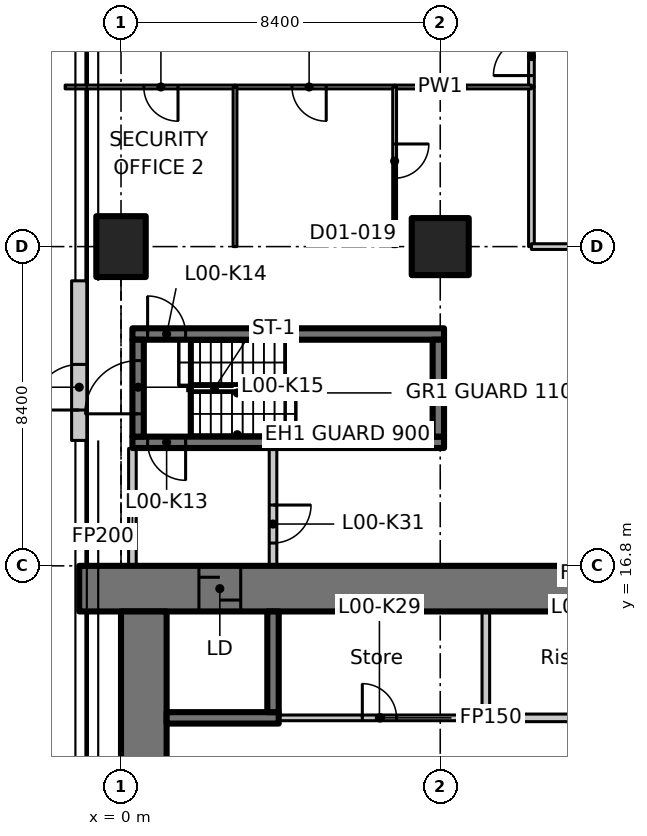
"""IFC4 building model, lengths in metres.
Left out: names, types, materials, properties, quantities, classifications, styles, units other than length and angle.
Written with IfcOpenShell. Run it as: python <this file> out.ifc"""

import sys

from ifc_helpers import new_model, si_unit, direction, frame, frame_2d, origin, origin_2d, place, context, subcontext, project, spatial, polyline, rectangle, outline, extrude, element, fill, save


model = new_model("IFC4")
c1 = context("Model", 3, precision=1e-05, world=origin(), true_north=direction((0.0, 1.0)))
c2 = subcontext(c1, "Body", "Model", "MODEL_VIEW")
j1 = project(units=[si_unit("LENGTHUNIT", "METRE"), si_unit("PLANEANGLEUNIT", "RADIAN")], contexts=[c1])
p1 = place(None, origin())
s1 = spatial("IfcSite", under=j1, at=p1, CompositionType="ELEMENT")
p2 = place(p1, origin())
s2 = spatial("IfcBuilding", under=s1, at=p2, CompositionType="ELEMENT")
p3 = place(p2, origin())
s3 = spatial("IfcBuildingStorey", under=s2, at=p3, CompositionType="ELEMENT", Elevation=0.0)
p4 = place(p3, frame((0.0, 25.2, 0.0), z_axis=(0.0, 0.0, 1.0), x_axis=(1.0, 0.0, 0.0)))
e1 = element("IfcColumn", 1, at=p4, inside=s3, PredefinedType="COLUMN", context=c2, shape_type="SweptSolid", body=[
    extrude(rectangle(XDim=1.3, YDim=1.6, at=origin_2d()), origin(), (0.0, 0.0, 1.0), 6.75),
])
p5 = place(p3, frame((8.4, 25.2, 0.0), z_axis=(0.0, 0.0, 1.0), x_axis=(1.0, 0.0, 0.0)))
e2 = element("IfcColumn", 2, at=p5, inside=s3, PredefinedType="COLUMN", context=c2, shape_type="SweptSolid", body=[
    extrude(rectangle(XDim=1.5, YDim=1.5, at=origin_2d()), origin(), (0.0, 0.0, 1.0), 6.75),
])
p6 = place(p3, frame((-4.1, 42.0, 0.0), z_axis=(1.0, 0.0, 0.0), x_axis=(0.0, 1.0, 0.0)))
e3 = element("IfcWall", 3, at=p6, inside=s3, PredefinedType="SOLIDWALL", context=c2, shape_type="SweptSolid", body=[
    extrude(outline(polyline([(13.304, 32.111), (13.636, 31.229), (13.909, 30.327), (14.123, 29.409), (14.277, 28.479), (14.369, 27.542), (14.4, 26.6), (14.4, 0.0), (8.4, 0.0), (8.4, 26.6), (8.382, 27.149), (8.328, 27.696), (8.239, 28.239), (8.114, 28.774), (7.954, 29.3), (7.76, 29.814), (7.534, 30.315), (7.275, 30.8), (6.984, 31.267), (6.664, 31.714), (6.315, 32.138), (5.94, 32.54), (5.539, 32.915), (5.114, 33.264), (4.667, 33.584), (4.2, 33.875), (3.715, 34.134), (3.215, 34.361), (2.7, 34.554), (2.174, 34.714), (1.639, 34.839), (1.096, 34.928), (0.549, 34.982), (0.0, 35.0), (-0.549, 34.982), (-1.096, 34.928), (-1.639, 34.839), (-2.174, 34.714), (-2.7, 34.554), (-3.215, 34.361), (-3.715, 34.134), (-4.2, 33.875), (-4.667, 33.584), (-5.114, 33.264), (-5.539, 32.915), (-5.94, 32.54), (-6.315, 32.138), (-6.664, 31.714), (-6.984, 31.267), (-7.275, 30.8), (-7.534, 30.315), (-7.76, 29.814), (-7.954, 29.3), (-8.114, 28.774), (-8.239, 28.239), (-8.328, 27.696), (-8.382, 27.149), (-8.4, 26.6), (-8.4, 0.0), (-14.4, 0.0), (-14.4, 26.6), (-14.369, 27.542), (-14.277, 28.479), (-14.123, 29.409), (-13.909, 30.327), (-13.636, 31.229), (-13.304, 32.111), (-13.241, 32.25), (-10.8, 32.25), (-10.8, 36.123), (-10.182, 36.782), (-9.495, 37.427), (-8.766, 38.024), (-8.0, 38.573), (-7.2, 39.071), (-6.369, 39.515), (-5.51, 39.904), (-4.629, 40.236), (-3.727, 40.509), (-2.809, 40.723), (-1.88, 40.877), (-0.942, 40.969), (0.0, 41.0), (0.942, 40.969), (1.88, 40.877), (2.809, 40.723), (3.727, 40.509), (4.629, 40.236), (5.51, 39.904), (6.369, 39.515), (7.2, 39.071), (8.0, 38.573), (8.766, 38.024), (9.495, 37.427), (10.182, 36.782), (10.8, 36.123), (10.8, 32.25), (13.241, 32.25), (13.304, 32.111)])), origin(), (0.0, 0.0, 1.0), 2.6),
])
p7 = place(p3, frame((-1.1, 20.1, 0.0), z_axis=(0.0, 0.0, 1.0), x_axis=(0.0, 1.0, 0.0)))
e4 = element("IfcWall", 4, at=p7, inside=s3, PredefinedType="SOLIDWALL", context=c2, shape_type="SweptSolid", body=[
    extrude(rectangle(XDim=4.2, YDim=0.4, at=frame_2d((2.1, 0.0))), origin(), (0.0, 0.0, 1.0), 6.75),
])
p8 = place(p7, frame((0.8, 0.0, 0.0)))
e5 = element("IfcOpeningElement", 5, at=p8, cuts=e4, PredefinedType="OPENING", context=c2, shape_type="SweptSolid", body=[
    extrude(rectangle(XDim=1.2, YDim=2.4, at=frame_2d((0.6, 1.2))), frame((0.0, 0.21, 0.0), z_axis=(0.0, -1.0, 0.0), x_axis=(1.0, 0.0, 0.0)), (0.0, 0.0, 1.0), 0.42),
])
p9 = place(p3, frame((-1.1, 16.2, 0.0), z_axis=(0.0, 0.0, 1.0), x_axis=(1.0, 0.0, 0.0)))
e6 = element("IfcWall", 6, at=p9, inside=s3, PredefinedType="SHEAR", context=c2, shape_type="SweptSolid", body=[
    extrude(rectangle(XDim=22.1, YDim=1.2, at=frame_2d((11.05, 0.0))), origin(), (0.0, 0.0, 1.0), 6.75),
])
p10 = place(p9, frame((3.15, 0.0, 0.0)))
e7 = element("IfcOpeningElement", 7, at=p10, cuts=e6, PredefinedType="OPENING", context=c2, shape_type="SweptSolid", body=[
    extrude(rectangle(XDim=1.1, YDim=2.3, at=frame_2d((0.55, 1.15))), frame((0.0, 0.61, 0.0), z_axis=(0.0, -1.0, 0.0), x_axis=(1.0, 0.0, 0.0)), (0.0, 0.0, 1.0), 1.22),
])
p11 = place(p3, frame((0.6, 6.736, 0.0), z_axis=(0.0, 0.0, 1.0), x_axis=(0.0, 1.0, 0.0)))
e8 = element("IfcWall", 8, at=p11, inside=s3, PredefinedType="SHEAR", context=c2, shape_type="SweptSolid", body=[
    extrude(rectangle(XDim=8.864, YDim=1.2, at=frame_2d((4.432, 0.0))), origin(), (0.0, 0.0, 1.0), 6.75),
])
p12 = place(p3, frame((1.2, 12.8, 0.0), z_axis=(0.0, 0.0, 1.0), x_axis=(1.0, 0.0, 0.0)))
e9 = element("IfcWall", 9, at=p12, inside=s3, PredefinedType="SHEAR", context=c2, shape_type="SweptSolid", body=[
    extrude(rectangle(XDim=2.95, YDim=0.3, at=frame_2d((1.475, 0.0))), origin(), (0.0, 0.0, 1.0), 6.75),
])
p13 = place(p3, frame((4.0, 12.95, 0.0), z_axis=(0.0, 0.0, 1.0), x_axis=(0.0, 1.0, 0.0)))
e10 = element("IfcWall", 10, at=p13, inside=s3, PredefinedType="SHEAR", context=c2, shape_type="SweptSolid", body=[
    extrude(rectangle(XDim=2.65, YDim=0.3, at=frame_2d((1.325, 0.0))), origin(), (0.0, 0.0, 1.0), 6.75),
])
p14 = place(p3, frame((8.5, 20.05, 0.0), z_axis=(0.0, 0.0, 1.0), x_axis=(-1.0, 0.0, 0.0)))
e11 = element("IfcWall", 11, at=p14, inside=s3, PredefinedType="SHEAR", context=c2, shape_type="SweptSolid", body=[
    extrude(rectangle(XDim=8.2, YDim=0.3, at=frame_2d((4.1, 0.0))), origin(), (0.0, 0.0, 1.0), 6.75),
])
p15 = place(p14, frame((6.8, 0.0, 0.0)))
e12 = element("IfcOpeningElement", 12, at=p15, cuts=e11, PredefinedType="OPENING", context=c2, shape_type="SweptSolid", body=[
    extrude(rectangle(XDim=1.0, YDim=2.1, at=frame_2d((0.5, 1.05))), frame((0.0, 0.16, 0.0), z_axis=(0.0, -1.0, 0.0), x_axis=(1.0, 0.0, 0.0)), (0.0, 0.0, 1.0), 0.32),
])
p16 = place(p3, frame((0.3, 22.9, 0.0), z_axis=(0.0, 0.0, 1.0), x_axis=(1.0, 0.0, 0.0)))
e13 = element("IfcWall", 13, at=p16, inside=s3, PredefinedType="SHEAR", context=c2, shape_type="SweptSolid", body=[
    extrude(rectangle(XDim=8.2, YDim=0.3, at=frame_2d((4.1, 0.0))), origin(), (0.0, 0.0, 1.0), 6.75),
])
p17 = place(p16, frame((0.4, 0.0, 0.0)))
e14 = element("IfcOpeningElement", 14, at=p17, cuts=e13, PredefinedType="OPENING", context=c2, shape_type="SweptSolid", body=[
    extrude(rectangle(XDim=1.0, YDim=2.1, at=frame_2d((0.5, 1.05))), frame((0.0, 0.16, 0.0), z_axis=(0.0, -1.0, 0.0), x_axis=(1.0, 0.0, 0.0)), (0.0, 0.0, 1.0), 0.32),
])
p18 = place(p3, frame((0.45, 20.2, 0.0), z_axis=(0.0, 0.0, 1.0), x_axis=(0.0, 1.0, 0.0)))
e15 = element("IfcWall", 15, at=p18, inside=s3, PredefinedType="SHEAR", context=c2, shape_type="SweptSolid", body=[
    extrude(rectangle(XDim=2.55, YDim=0.3, at=frame_2d((1.275, 0.0))), origin(), (0.0, 0.0, 1.0), 6.75),
])
p19 = place(p18, frame((0.6, 0.0, 0.0)))
e16 = element("IfcOpeningElement", 16, at=p19, cuts=e15, PredefinedType="OPENING", context=c2, shape_type="SweptSolid", body=[
    extrude(rectangle(XDim=1.4, YDim=2.1, at=frame_2d((0.7, 1.05))), frame((0.0, 0.16, 0.0), z_axis=(0.0, -1.0, 0.0), x_axis=(1.0, 0.0, 0.0)), (0.0, 0.0, 1.0), 0.32),
])
p20 = place(p3, frame((8.35, 20.2, 0.0), z_axis=(0.0, 0.0, 1.0), x_axis=(0.0, 1.0, 0.0)))
e17 = element("IfcWall", 17, at=p20, inside=s3, PredefinedType="SHEAR", context=c2, shape_type="SweptSolid", body=[
    extrude(rectangle(XDim=2.55, YDim=0.3, at=frame_2d((1.275, 0.0))), origin(), (0.0, 0.0, 1.0), 6.75),
])
p21 = place(p3, frame((0.3, 16.812, 0.0), z_axis=(0.0, 0.0, 1.0), x_axis=(0.0, 1.0, 0.0)))
e18 = element("IfcWall", 18, at=p21, inside=s3, PredefinedType="PARTITIONING", context=c2, shape_type="SweptSolid", body=[
    extrude(rectangle(XDim=3.076, YDim=0.2, at=frame_2d((1.538, 0.0))), origin(), (0.0, 0.0, 1.0), 6.38),
])
p22 = place(p3, frame((4.0, 19.888, 0.0), z_axis=(0.0, 0.0, 1.0), x_axis=(0.0, -1.0, 0.0)))
e19 = element("IfcWall", 19, at=p22, inside=s3, PredefinedType="PARTITIONING", context=c2, shape_type="SweptSolid", body=[
    extrude(rectangle(XDim=3.076, YDim=0.2, at=frame_2d((1.538, 0.0))), origin(), (0.0, 0.0, 1.0), 6.75),
])
p23 = place(p22, frame((1.488, 0.0, 0.0)))
e20 = element("IfcOpeningElement", 20, at=p23, cuts=e19, PredefinedType="OPENING", context=c2, shape_type="SweptSolid", body=[
    extrude(rectangle(XDim=1.0, YDim=2.1, at=frame_2d((0.5, 1.05))), frame((0.0, 0.11, 0.0), z_axis=(0.0, -1.0, 0.0), x_axis=(1.0, 0.0, 0.0)), (0.0, 0.0, 1.0), 0.22),
])
p24 = place(p3, frame((9.6, 15.588, 0.0), z_axis=(0.0, 0.0, 1.0), x_axis=(0.0, -1.0, 0.0)))
e21 = element("IfcWall", 21, at=p24, inside=s3, PredefinedType="PARTITIONING", context=c2, shape_type="SweptSolid", body=[
    extrude(rectangle(XDim=2.788, YDim=0.2, at=frame_2d((1.394, 0.0))), origin(), (0.0, 0.0, 1.0), 6.75),
])
p25 = place(p3, frame((9.7, 12.8, 0.0), z_axis=(0.0, 0.0, 1.0), x_axis=(1.0, 0.0, 0.0)))
e22 = element("IfcWall", 22, at=p25, inside=s3, PredefinedType="PARTITIONING", context=c2, shape_type="SweptSolid", body=[
    extrude(rectangle(XDim=5.338, YDim=0.2, at=frame_2d((2.669, 0.0))), origin(), (0.0, 0.0, 1.0), 6.75),
])
p26 = place(p25, frame((2.25, 0.0, 0.0)))
e23 = element("IfcOpeningElement", 23, at=p26, cuts=e22, PredefinedType="OPENING", context=c2, shape_type="SweptSolid", body=[
    extrude(rectangle(XDim=0.9, YDim=2.1, at=frame_2d((0.45, 1.05))), frame((0.0, 0.11, 0.0), z_axis=(0.0, -1.0, 0.0), x_axis=(1.0, 0.0, 0.0)), (0.0, 0.0, 1.0), 0.22),
])
p27 = place(p3, frame((4.162, 12.8, 0.0), z_axis=(0.0, 0.0, 1.0), x_axis=(1.0, 0.0, 0.0)))
e24 = element("IfcWall", 24, at=p27, inside=s3, PredefinedType="PARTITIONING", context=c2, shape_type="SweptSolid", body=[
    extrude(rectangle(XDim=5.338, YDim=0.15, at=frame_2d((2.669, 0.0))), origin(), (0.0, 0.0, 1.0), 6.75),
])
p28 = place(p27, frame((2.188, 0.0, 0.0)))
e25 = element("IfcOpeningElement", 25, at=p28, cuts=e24, PredefinedType="OPENING", context=c2, shape_type="SweptSolid", body=[
    extrude(rectangle(XDim=0.9, YDim=2.1, at=frame_2d((0.45, 1.05))), frame((0.0, 0.085, 0.0), z_axis=(0.0, -1.0, 0.0), x_axis=(1.0, 0.0, 0.0)), (0.0, 0.0, 1.0), 0.17),
])
p29 = place(p3, frame((10.8, 29.4, 0.0), z_axis=(0.0, 0.0, 1.0), x_axis=(0.0, 1.0, 0.0)))
e26 = element("IfcWall", 26, at=p29, inside=s3, PredefinedType="PARTITIONING", context=c2, shape_type="SweptSolid", body=[
    extrude(rectangle(XDim=1.8, YDim=0.15, at=frame_2d((0.9, 0.0))), origin(), (0.0, 0.0, 1.0), 6.73),
])
p30 = place(p29, frame((0.3, 0.0, 0.0)))
e27 = element("IfcOpeningElement", 27, at=p30, cuts=e26, PredefinedType="OPENING", context=c2, shape_type="SweptSolid", body=[
    extrude(rectangle(XDim=1.0, YDim=2.1, at=frame_2d((0.5, 1.05))), frame((0.0, 0.085, 0.0), z_axis=(0.0, -1.0, 0.0), x_axis=(1.0, 0.0, 0.0)), (0.0, 0.0, 1.0), 0.17),
])
p31 = place(p3, frame((10.8, 25.2, 0.0), z_axis=(0.0, 0.0, 1.0), x_axis=(0.0, 1.0, 0.0)))
e28 = element("IfcWall", 28, at=p31, inside=s3, PredefinedType="PARTITIONING", context=c2, shape_type="SweptSolid", body=[
    extrude(rectangle(XDim=4.2, YDim=0.15, at=frame_2d((2.1, 0.0))), origin(), (0.0, 0.0, 1.0), 6.73),
])
p32 = place(p3, frame((3.0, 29.4, 0.0), z_axis=(0.0, 0.0, 1.0), x_axis=(-1.0, 0.0, 0.0)))
e29 = element("IfcWall", 29, at=p32, inside=s3, PredefinedType="PARTITIONING", context=c2, shape_type="SweptSolid", body=[
    extrude(rectangle(XDim=4.47, YDim=0.1, at=frame_2d((2.235, 0.0))), origin(), (0.0, 0.0, 1.0), 6.73),
])
p33 = place(p32, frame((1.5, 0.0, 0.0)))
e30 = element("IfcOpeningElement", 30, at=p33, cuts=e29, PredefinedType="OPENING", context=c2, shape_type="SweptSolid", body=[
    extrude(rectangle(XDim=0.9, YDim=2.1, at=frame_2d((0.45, 1.05))), frame((0.0, 0.06, 0.0), z_axis=(0.0, -1.0, 0.0), x_axis=(1.0, 0.0, 0.0)), (0.0, 0.0, 1.0), 0.12),
])
p34 = place(p3, frame((7.2, 29.4, 0.0), z_axis=(0.0, 0.0, 1.0), x_axis=(-1.0, 0.0, 0.0)))
e31 = element("IfcWall", 31, at=p34, inside=s3, PredefinedType="PARTITIONING", context=c2, shape_type="SweptSolid", body=[
    extrude(rectangle(XDim=4.2, YDim=0.1, at=frame_2d((2.1, 0.0))), origin(), (0.0, 0.0, 1.0), 6.73),
])
p35 = place(p34, frame((1.8, 0.0, 0.0)))
e32 = element("IfcOpeningElement", 32, at=p35, cuts=e31, PredefinedType="OPENING", context=c2, shape_type="SweptSolid", body=[
    extrude(rectangle(XDim=0.9, YDim=2.1, at=frame_2d((0.45, 1.05))), frame((0.0, 0.06, 0.0), z_axis=(0.0, -1.0, 0.0), x_axis=(1.0, 0.0, 0.0)), (0.0, 0.0, 1.0), 0.12),
])
p36 = place(p3, frame((10.8, 29.4, 0.0), z_axis=(0.0, 0.0, 1.0), x_axis=(-1.0, 0.0, 0.0)))
e33 = element("IfcWall", 33, at=p36, inside=s3, PredefinedType="PARTITIONING", context=c2, shape_type="SweptSolid", body=[
    extrude(rectangle(XDim=3.6, YDim=0.1, at=frame_2d((1.8, 0.0))), origin(), (0.0, 0.0, 1.0), 6.73),
])
p37 = place(p3, frame((3.0, 29.4, 0.0), z_axis=(0.0, 0.0, 1.0), x_axis=(0.0, -1.0, 0.0)))
e34 = element("IfcWall", 34, at=p37, inside=s3, PredefinedType="PARTITIONING", context=c2, shape_type="SweptSolid", body=[
    extrude(rectangle(XDim=4.2, YDim=0.1, at=frame_2d((2.1, 0.0))), origin(), (0.0, 0.0, 1.0), 6.73),
])
p38 = place(p3, frame((7.2, 29.4, 0.0), z_axis=(0.0, 0.0, 1.0), x_axis=(0.0, -1.0, 0.0)))
e35 = element("IfcWall", 35, at=p38, inside=s3, PredefinedType="PARTITIONING", context=c2, shape_type="SweptSolid", body=[
    extrude(rectangle(XDim=4.2, YDim=0.1, at=frame_2d((2.1, 0.0))), origin(), (0.0, 0.0, 1.0), 6.73),
])
p39 = place(p38, frame((1.5, 0.0, 0.0)))
e36 = element("IfcOpeningElement", 36, at=p39, cuts=e35, PredefinedType="OPENING", context=c2, shape_type="SweptSolid", body=[
    extrude(rectangle(XDim=0.9, YDim=2.1, at=frame_2d((0.45, 1.05))), frame((0.0, 0.06, 0.0), z_axis=(0.0, -1.0, 0.0), x_axis=(1.0, 0.0, 0.0)), (0.0, 0.0, 1.0), 0.12),
])
p40 = place(p3, frame((15.8, 25.2, 0.0), z_axis=(0.0, 0.0, 1.0), x_axis=(-1.0, 0.0, 0.0)))
e37 = element("IfcWall", 37, at=p40, inside=s3, PredefinedType="PARTITIONING", context=c2, shape_type="SweptSolid", body=[
    extrude(rectangle(XDim=5.0, YDim=0.15, at=frame_2d((2.5, 0.0))), origin(), (0.0, 0.0, 1.0), 6.73),
])
p41 = place(p40, frame((1.65, 0.0, 0.0)))
e38 = element("IfcOpeningElement", 38, at=p41, cuts=e37, PredefinedType="OPENING", context=c2, shape_type="SweptSolid", body=[
    extrude(rectangle(XDim=1.8, YDim=2.1, at=frame_2d((0.9, 1.05))), frame((0.0, 0.085, 0.0), z_axis=(0.0, -1.0, 0.0), x_axis=(1.0, 0.0, 0.0)), (0.0, 0.0, 1.0), 0.17),
])
p42 = place(p8, origin())
e39 = element("IfcDoor", 39, at=p42, inside=s3, OperationType="SINGLE_SWING_LEFT", PredefinedType="DOOR", context=c2, shape_type="SweptSolid", body=[
    extrude(rectangle(XDim=1.2, YDim=2.4, at=frame_2d((0.6, 1.2))), frame((0.0, 0.025, 0.0), z_axis=(0.0, -1.0, 0.0), x_axis=(1.0, 0.0, 0.0)), (0.0, 0.0, 1.0), 0.05),
])
fill(e5, e39)
p43 = place(p10, origin())
e40 = element("IfcDoor", 40, at=p43, inside=s3, OperationType="SLIDING_TO_LEFT", PredefinedType="DOOR", context=c2, shape_type="SweptSolid", body=[
    extrude(rectangle(XDim=1.1, YDim=2.3, at=frame_2d((0.55, 1.15))), frame((0.0, 0.025, 0.0), z_axis=(0.0, -1.0, 0.0), x_axis=(1.0, 0.0, 0.0)), (0.0, 0.0, 1.0), 0.05),
])
fill(e7, e40)
p44 = place(p15, origin())
e41 = element("IfcDoor", 41, at=p44, inside=s3, OperationType="SINGLE_SWING_RIGHT", PredefinedType="DOOR", context=c2, shape_type="SweptSolid", body=[
    extrude(rectangle(XDim=1.0, YDim=2.1, at=frame_2d((0.5, 1.05))), frame((0.0, 0.025, 0.0), z_axis=(0.0, -1.0, 0.0), x_axis=(1.0, 0.0, 0.0)), (0.0, 0.0, 1.0), 0.05),
])
fill(e12, e41)
p45 = place(p17, origin())
e42 = element("IfcDoor", 42, at=p45, inside=s3, OperationType="SINGLE_SWING_LEFT", PredefinedType="DOOR", context=c2, shape_type="SweptSolid", body=[
    extrude(rectangle(XDim=1.0, YDim=2.1, at=frame_2d((0.5, 1.05))), frame((0.0, 0.025, 0.0), z_axis=(0.0, -1.0, 0.0), x_axis=(1.0, 0.0, 0.0)), (0.0, 0.0, 1.0), 0.05),
])
fill(e14, e42)
p46 = place(p19, origin())
e43 = element("IfcDoor", 43, at=p46, inside=s3, OperationType="SINGLE_SWING_RIGHT", PredefinedType="DOOR", context=c2, shape_type="SweptSolid", body=[
    extrude(rectangle(XDim=1.4, YDim=2.1, at=frame_2d((0.7, 1.05))), frame((0.0, 0.025, 0.0), z_axis=(0.0, -1.0, 0.0), x_axis=(1.0, 0.0, 0.0)), (0.0, 0.0, 1.0), 0.05),
])
fill(e16, e43)
p47 = place(p28, origin())
e44 = element("IfcDoor", 44, at=p47, inside=s3, OperationType="SINGLE_SWING_RIGHT", PredefinedType="DOOR", context=c2, shape_type="SweptSolid", body=[
    extrude(rectangle(XDim=0.9, YDim=2.1, at=frame_2d((0.45, 1.05))), frame((0.0, 0.025, 0.0), z_axis=(0.0, -1.0, 0.0), x_axis=(1.0, 0.0, 0.0)), (0.0, 0.0, 1.0), 0.05),
])
fill(e25, e44)
p48 = place(p23, origin())
e45 = element("IfcDoor", 45, at=p48, inside=s3, OperationType="SINGLE_SWING_RIGHT", PredefinedType="DOOR", context=c2, shape_type="SweptSolid", body=[
    extrude(rectangle(XDim=1.0, YDim=2.1, at=frame_2d((0.5, 1.05))), frame((0.0, 0.025, 0.0), z_axis=(0.0, -1.0, 0.0), x_axis=(1.0, 0.0, 0.0)), (0.0, 0.0, 1.0), 0.05),
])
fill(e20, e45)
p49 = place(p30, origin())
e46 = element("IfcDoor", 46, at=p49, inside=s3, OperationType="SINGLE_SWING_LEFT", PredefinedType="DOOR", context=c2, shape_type="SweptSolid", body=[
    extrude(rectangle(XDim=1.0, YDim=2.1, at=frame_2d((0.5, 1.05))), frame((0.0, 0.025, 0.0), z_axis=(0.0, -1.0, 0.0), x_axis=(1.0, 0.0, 0.0)), (0.0, 0.0, 1.0), 0.05),
])
fill(e27, e46)
p50 = place(p33, origin())
e47 = element("IfcDoor", 47, at=p50, inside=s3, OperationType="SINGLE_SWING_LEFT", PredefinedType="DOOR", context=c2, shape_type="SweptSolid", body=[
    extrude(rectangle(XDim=0.9, YDim=2.1, at=frame_2d((0.45, 1.05))), frame((0.0, 0.025, 0.0), z_axis=(0.0, -1.0, 0.0), x_axis=(1.0, 0.0, 0.0)), (0.0, 0.0, 1.0), 0.05),
])
fill(e30, e47)
p51 = place(p35, origin())
e48 = element("IfcDoor", 48, at=p51, inside=s3, OperationType="SINGLE_SWING_LEFT", PredefinedType="DOOR", context=c2, shape_type="SweptSolid", body=[
    extrude(rectangle(XDim=0.9, YDim=2.1, at=frame_2d((0.45, 1.05))), frame((0.0, 0.025, 0.0), z_axis=(0.0, -1.0, 0.0), x_axis=(1.0, 0.0, 0.0)), (0.0, 0.0, 1.0), 0.05),
])
fill(e32, e48)
p52 = place(p39, origin())
e49 = element("IfcDoor", 49, at=p52, inside=s3, OperationType="SINGLE_SWING_LEFT", PredefinedType="DOOR", context=c2, shape_type="SweptSolid", body=[
    extrude(rectangle(XDim=0.9, YDim=2.1, at=frame_2d((0.45, 1.05))), frame((0.0, 0.025, 0.0), z_axis=(0.0, -1.0, 0.0), x_axis=(1.0, 0.0, 0.0)), (0.0, 0.0, 1.0), 0.05),
])
fill(e36, e49)
save(model, sys.argv[1])
